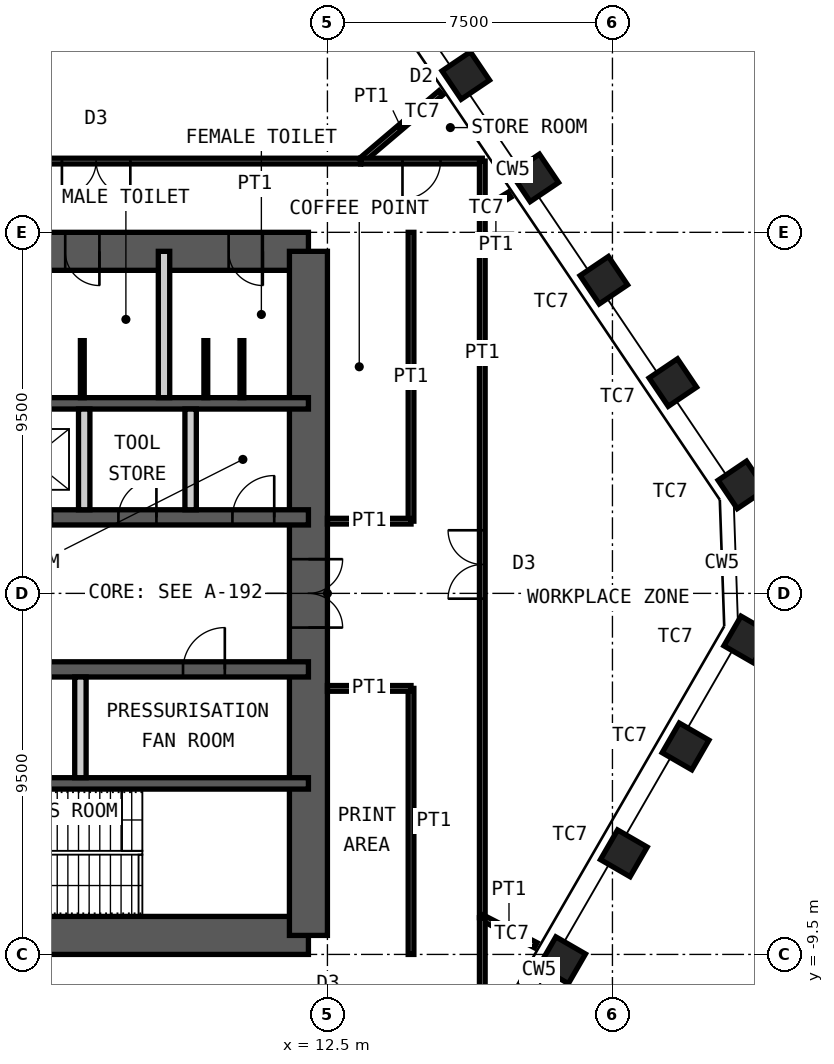
"""IFC4 building model, lengths in metres.
Left out: names, types, materials, properties, quantities, classifications, styles, units other than length and angle.
Written with IfcOpenShell. Run it as: python <this file> out.ifc"""

import sys

from ifc_helpers import new_model, si_unit, direction, frame, frame_2d, origin, origin_2d, place, context, subcontext, project, spatial, rectangle, hollow_rectangle, extrude, element, fill, save


model = new_model("IFC4")
c1 = context("Model", 3, precision=1e-05, world=origin(), true_north=direction((0.0, 1.0)))
c2 = subcontext(c1, "Body", "Model", "MODEL_VIEW")
j1 = project(units=[si_unit("LENGTHUNIT", "METRE"), si_unit("PLANEANGLEUNIT", "RADIAN")], contexts=[c1])
p1 = place(None, origin())
s1 = spatial("IfcSite", under=j1, at=p1, CompositionType="ELEMENT")
p2 = place(p1, origin())
s2 = spatial("IfcBuilding", under=s1, at=p2, CompositionType="ELEMENT")
p3 = place(p2, frame((0.0, 0.0, 291.4)))
s3 = spatial("IfcBuildingStorey", under=s2, at=p3, CompositionType="ELEMENT", Elevation=291.4)
for number, where, z_axis, x_axis in (
    (1, (16.141, 13.625, 0.0), (0.0, 0.0, 1.0), (-0.559, 0.829, 0.0)),
    (2, (17.957, 10.932, 0.0), (0.0, 0.0, 1.0), (-0.559, 0.829, 0.0)),
    (3, (19.773, 8.239, 0.0), (0.0, 0.0, 1.0), (-0.559, 0.829, 0.0)),
    (4, (21.589, 5.547, 0.0), (0.0, 0.0, 1.0), (-0.559, 0.829, 0.0)),
    (5, (23.406, 2.854, 0.0), (0.0, 0.0, 1.0), (-0.559, 0.829, 0.0)),
    (6, (23.548, -1.214, 0.0), (0.0, 0.0, 1.0), (0.5, 0.866, 0.0)),
    (7, (21.924, -4.027, 0.0), (0.0, 0.0, 1.0), (0.5, 0.866, 0.0)),
    (8, (20.3, -6.84, 0.0), (0.0, 0.0, 1.0), (0.5, 0.866, 0.0)),
    (9, (18.676, -9.653, 0.0), (0.0, 0.0, 1.0), (0.5, 0.866, 0.0)),
):
    element("IfcColumn", number, at=place(p3, frame(where, z_axis=z_axis, x_axis=x_axis)), inside=s3, PredefinedType="COLUMN", context=c2, shape_type="SweptSolid", body=[
        extrude(hollow_rectangle(XDim=0.9, YDim=0.9, WallThickness=0.06, at=origin_2d()), origin(), (0.0, 0.0, 1.0), 4.2),
    ])
p4 = place(p3, frame((-12.0, 9.0, 0.0), z_axis=(0.0, 0.0, 1.0), x_axis=(1.0, 0.0, 0.0)))
e10 = element("IfcWall", 10, at=p4, inside=s3, PredefinedType="SHEAR", context=c2, shape_type="SweptSolid", body=[
    extrude(rectangle(XDim=24.0, YDim=1.0, at=frame_2d((12.0, 0.0))), origin(), (0.0, 0.0, 1.0), 4.2),
])
p5 = place(p4, frame((10.4, 0.0, 0.0)))
e11 = element("IfcOpeningElement", 11, at=p5, cuts=e10, PredefinedType="OPENING", context=c2, shape_type="SweptSolid", body=[
    extrude(rectangle(XDim=1.0, YDim=2.1, at=frame_2d((0.5, 1.05))), frame((0.0, 0.51, 0.0), z_axis=(0.0, -1.0, 0.0), x_axis=(1.0, 0.0, 0.0)), (0.0, 0.0, 1.0), 1.02),
])
p6 = place(p4, frame((17.6, 0.0, 0.0)))
e12 = element("IfcOpeningElement", 12, at=p6, cuts=e10, PredefinedType="OPENING", context=c2, shape_type="SweptSolid", body=[
    extrude(rectangle(XDim=0.9, YDim=2.1, at=frame_2d((0.45, 1.05))), frame((0.0, 0.51, 0.0), z_axis=(0.0, -1.0, 0.0), x_axis=(1.0, 0.0, 0.0)), (0.0, 0.0, 1.0), 1.02),
])
p7 = place(p4, frame((21.9, 0.0, 0.0)))
e13 = element("IfcOpeningElement", 13, at=p7, cuts=e10, PredefinedType="OPENING", context=c2, shape_type="SweptSolid", body=[
    extrude(rectangle(XDim=0.9, YDim=2.1, at=frame_2d((0.45, 1.05))), frame((0.0, 0.51, 0.0), z_axis=(0.0, -1.0, 0.0), x_axis=(1.0, 0.0, 0.0)), (0.0, 0.0, 1.0), 1.02),
])
p8 = place(p3, frame((-12.0, -9.0, 0.0), z_axis=(0.0, 0.0, 1.0), x_axis=(1.0, 0.0, 0.0)))
e14 = element("IfcWall", 14, at=p8, inside=s3, PredefinedType="SHEAR", context=c2, shape_type="SweptSolid", body=[
    extrude(rectangle(XDim=24.0, YDim=1.0, at=frame_2d((12.0, 0.0))), origin(), (0.0, 0.0, 1.0), 4.2),
])
p9 = place(p8, frame((1.35, 0.0, 0.0)))
e15 = element("IfcOpeningElement", 15, at=p9, cuts=e14, PredefinedType="OPENING", context=c2, shape_type="SweptSolid", body=[
    extrude(rectangle(XDim=1.0, YDim=2.1, at=frame_2d((0.5, 1.05))), frame((0.0, 0.51, 0.0), z_axis=(0.0, -1.0, 0.0), x_axis=(1.0, 0.0, 0.0)), (0.0, 0.0, 1.0), 1.02),
])
p10 = place(p8, frame((5.325, 0.0, 0.0)))
e16 = element("IfcOpeningElement", 16, at=p10, cuts=e14, PredefinedType="OPENING", context=c2, shape_type="SweptSolid", body=[
    extrude(rectangle(XDim=1.15, YDim=2.1, at=frame_2d((0.575, 1.05))), frame((0.0, 0.51, 0.0), z_axis=(0.0, -1.0, 0.0), x_axis=(1.0, 0.0, 0.0)), (0.0, 0.0, 1.0), 1.02),
])
p11 = place(p8, frame((12.6, 0.0, 0.0)))
e17 = element("IfcOpeningElement", 17, at=p11, cuts=e14, PredefinedType="OPENING", context=c2, shape_type="SweptSolid", body=[
    extrude(rectangle(XDim=1.0, YDim=2.1, at=frame_2d((0.5, 1.05))), frame((0.0, 0.51, 0.0), z_axis=(0.0, -1.0, 0.0), x_axis=(1.0, 0.0, 0.0)), (0.0, 0.0, 1.0), 1.02),
])
p12 = place(p3, frame((12.0, -9.0, 0.0), z_axis=(0.0, 0.0, 1.0), x_axis=(0.0, 1.0, 0.0)))
e18 = element("IfcWall", 18, at=p12, inside=s3, PredefinedType="SHEAR", context=c2, shape_type="SweptSolid", body=[
    extrude(rectangle(XDim=18.0, YDim=1.0, at=frame_2d((9.0, 0.0))), origin(), (0.0, 0.0, 1.0), 4.2),
])
p13 = place(p12, frame((8.1, 0.0, 0.0)))
e19 = element("IfcOpeningElement", 19, at=p13, cuts=e18, PredefinedType="OPENING", context=c2, shape_type="SweptSolid", body=[
    extrude(rectangle(XDim=1.8, YDim=2.1, at=frame_2d((0.9, 1.05))), frame((0.0, 0.51, 0.0), z_axis=(0.0, -1.0, 0.0), x_axis=(1.0, 0.0, 0.0)), (0.0, 0.0, 1.0), 1.02),
])
p14 = place(p3, frame((-12.0, 5.0, 0.0), z_axis=(0.0, 0.0, 1.0), x_axis=(1.0, 0.0, 0.0)))
e20 = element("IfcWall", 20, at=p14, inside=s3, PredefinedType="SHEAR", context=c2, shape_type="SweptSolid", body=[
    extrude(rectangle(XDim=24.0, YDim=0.3, at=frame_2d((12.0, 0.0))), origin(), (0.0, 0.0, 1.0), 4.2),
])
p15 = place(p3, frame((-12.0, 2.0, 0.0), z_axis=(0.0, 0.0, 1.0), x_axis=(1.0, 0.0, 0.0)))
e21 = element("IfcWall", 21, at=p15, inside=s3, PredefinedType="SHEAR", context=c2, shape_type="SweptSolid", body=[
    extrude(rectangle(XDim=24.0, YDim=0.4, at=frame_2d((12.0, 0.0))), origin(), (0.0, 0.0, 1.0), 4.2),
])
p16 = place(p15, frame((2.4, 0.0, 0.0)))
e22 = element("IfcOpeningElement", 22, at=p16, cuts=e21, PredefinedType="OPENING", context=c2, shape_type="SweptSolid", body=[
    extrude(rectangle(XDim=1.1, YDim=2.1, at=frame_2d((0.55, 1.05))), frame((0.0, 0.21, 0.0), z_axis=(0.0, -1.0, 0.0), x_axis=(1.0, 0.0, 0.0)), (0.0, 0.0, 1.0), 0.42),
])
p17 = place(p15, frame((22.0, 0.0, 0.0)))
e23 = element("IfcOpeningElement", 23, at=p17, cuts=e21, PredefinedType="OPENING", context=c2, shape_type="SweptSolid", body=[
    extrude(rectangle(XDim=1.1, YDim=2.1, at=frame_2d((0.55, 1.05))), frame((0.0, 0.21, 0.0), z_axis=(0.0, -1.0, 0.0), x_axis=(1.0, 0.0, 0.0)), (0.0, 0.0, 1.0), 0.42),
])
p18 = place(p15, frame((10.15, 0.0, 0.0)))
e24 = element("IfcOpeningElement", 24, at=p18, cuts=e21, PredefinedType="OPENING", context=c2, shape_type="SweptSolid", body=[
    extrude(rectangle(XDim=1.0, YDim=2.1, at=frame_2d((0.5, 1.05))), frame((0.0, 0.21, 0.0), z_axis=(0.0, -1.0, 0.0), x_axis=(1.0, 0.0, 0.0)), (0.0, 0.0, 1.0), 0.42),
])
p19 = place(p15, frame((6.9, 0.0, 0.0)))
e25 = element("IfcOpeningElement", 25, at=p19, cuts=e21, PredefinedType="OPENING", context=c2, shape_type="SweptSolid", body=[
    extrude(rectangle(XDim=1.0, YDim=2.1, at=frame_2d((0.5, 1.05))), frame((0.0, 0.21, 0.0), z_axis=(0.0, -1.0, 0.0), x_axis=(1.0, 0.0, 0.0)), (0.0, 0.0, 1.0), 0.42),
])
p20 = place(p15, frame((13.35, 0.0, 0.0)))
e26 = element("IfcOpeningElement", 26, at=p20, cuts=e21, PredefinedType="OPENING", context=c2, shape_type="SweptSolid", body=[
    extrude(rectangle(XDim=1.1, YDim=2.4, at=frame_2d((0.55, 1.2))), frame((0.0, 0.21, 0.0), z_axis=(0.0, -1.0, 0.0), x_axis=(1.0, 0.0, 0.0)), (0.0, 0.0, 1.0), 0.42),
])
p21 = place(p15, frame((16.15, 0.0, 0.0)))
e27 = element("IfcOpeningElement", 27, at=p21, cuts=e21, PredefinedType="OPENING", context=c2, shape_type="SweptSolid", body=[
    extrude(rectangle(XDim=1.1, YDim=2.4, at=frame_2d((0.55, 1.2))), frame((0.0, 0.21, 0.0), z_axis=(0.0, -1.0, 0.0), x_axis=(1.0, 0.0, 0.0)), (0.0, 0.0, 1.0), 0.42),
])
p22 = place(p15, frame((19.0, 0.0, 0.0)))
e28 = element("IfcOpeningElement", 28, at=p22, cuts=e21, PredefinedType="OPENING", context=c2, shape_type="SweptSolid", body=[
    extrude(rectangle(XDim=1.0, YDim=2.1, at=frame_2d((0.5, 1.05))), frame((0.0, 0.21, 0.0), z_axis=(0.0, -1.0, 0.0), x_axis=(1.0, 0.0, 0.0)), (0.0, 0.0, 1.0), 0.42),
])
p23 = place(p3, frame((-12.0, -2.0, 0.0), z_axis=(0.0, 0.0, 1.0), x_axis=(1.0, 0.0, 0.0)))
e29 = element("IfcWall", 29, at=p23, inside=s3, PredefinedType="SHEAR", context=c2, shape_type="SweptSolid", body=[
    extrude(rectangle(XDim=24.0, YDim=0.4, at=frame_2d((12.0, 0.0))), origin(), (0.0, 0.0, 1.0), 4.2),
])
p24 = place(p23, frame((1.1, 0.0, 0.0)))
e30 = element("IfcOpeningElement", 30, at=p24, cuts=e29, PredefinedType="OPENING", context=c2, shape_type="SweptSolid", body=[
    extrude(rectangle(XDim=1.1, YDim=2.1, at=frame_2d((0.55, 1.05))), frame((0.0, 0.21, 0.0), z_axis=(0.0, -1.0, 0.0), x_axis=(1.0, 0.0, 0.0)), (0.0, 0.0, 1.0), 0.42),
])
p25 = place(p23, frame((13.55, 0.0, 0.0)))
e31 = element("IfcOpeningElement", 31, at=p25, cuts=e29, PredefinedType="OPENING", context=c2, shape_type="SweptSolid", body=[
    extrude(rectangle(XDim=1.1, YDim=2.1, at=frame_2d((0.55, 1.05))), frame((0.0, 0.21, 0.0), z_axis=(0.0, -1.0, 0.0), x_axis=(1.0, 0.0, 0.0)), (0.0, 0.0, 1.0), 0.42),
])
p26 = place(p23, frame((20.7, 0.0, 0.0)))
e32 = element("IfcOpeningElement", 32, at=p26, cuts=e29, PredefinedType="OPENING", context=c2, shape_type="SweptSolid", body=[
    extrude(rectangle(XDim=1.1, YDim=2.1, at=frame_2d((0.55, 1.05))), frame((0.0, 0.21, 0.0), z_axis=(0.0, -1.0, 0.0), x_axis=(1.0, 0.0, 0.0)), (0.0, 0.0, 1.0), 0.42),
])
p27 = place(p23, frame((4.0, 0.0, 0.0)))
e33 = element("IfcOpeningElement", 33, at=p27, cuts=e29, PredefinedType="OPENING", context=c2, shape_type="SweptSolid", body=[
    extrude(rectangle(XDim=1.0, YDim=2.1, at=frame_2d((0.5, 1.05))), frame((0.0, 0.21, 0.0), z_axis=(0.0, -1.0, 0.0), x_axis=(1.0, 0.0, 0.0)), (0.0, 0.0, 1.0), 0.42),
])
p28 = place(p23, frame((6.8, 0.0, 0.0)))
e34 = element("IfcOpeningElement", 34, at=p28, cuts=e29, PredefinedType="OPENING", context=c2, shape_type="SweptSolid", body=[
    extrude(rectangle(XDim=1.0, YDim=2.1, at=frame_2d((0.5, 1.05))), frame((0.0, 0.21, 0.0), z_axis=(0.0, -1.0, 0.0), x_axis=(1.0, 0.0, 0.0)), (0.0, 0.0, 1.0), 0.42),
])
p29 = place(p23, frame((9.6, 0.0, 0.0)))
e35 = element("IfcOpeningElement", 35, at=p29, cuts=e29, PredefinedType="OPENING", context=c2, shape_type="SweptSolid", body=[
    extrude(rectangle(XDim=1.0, YDim=2.1, at=frame_2d((0.5, 1.05))), frame((0.0, 0.21, 0.0), z_axis=(0.0, -1.0, 0.0), x_axis=(1.0, 0.0, 0.0)), (0.0, 0.0, 1.0), 0.42),
])
p30 = place(p3, frame((-12.0, -5.0, 0.0), z_axis=(0.0, 0.0, 1.0), x_axis=(1.0, 0.0, 0.0)))
e36 = element("IfcWall", 36, at=p30, inside=s3, PredefinedType="SHEAR", context=c2, shape_type="SweptSolid", body=[
    extrude(rectangle(XDim=24.0, YDim=0.3, at=frame_2d((12.0, 0.0))), origin(), (0.0, 0.0, 1.0), 4.2),
])
p31 = place(p3, frame((8.2, 5.15, 0.0), z_axis=(0.0, 0.0, 1.0), x_axis=(0.0, 1.0, 0.0)))
e37 = element("IfcWall", 37, at=p31, inside=s3, PredefinedType="PARTITIONING", context=c2, shape_type="SweptSolid", body=[
    extrude(rectangle(XDim=3.85, YDim=0.3, at=frame_2d((1.925, 0.0))), origin(), (0.0, 0.0, 1.0), 3.98),
])
for number, where, z_axis, x_axis in (
    (38, (6.1, 2.2, 0.0), (0.0, 0.0, 1.0), (0.0, 1.0, 0.0)),
    (39, (8.9, 2.2, 0.0), (0.0, 0.0, 1.0), (0.0, 1.0, 0.0)),
    (40, (6.0, -4.85, 0.0), (0.0, 0.0, 1.0), (0.0, 1.0, 0.0)),
):
    element("IfcWall", number, at=place(p3, frame(where, z_axis=z_axis, x_axis=x_axis)), inside=s3, PredefinedType="PARTITIONING", context=c2, shape_type="SweptSolid", body=[
        extrude(rectangle(XDim=2.65, YDim=0.3, at=frame_2d((1.325, 0.0))), origin(), (0.0, 0.0, 1.0), 3.98),
    ])
for number, where, z_axis, x_axis in (
    (41, (6.05, 5.15, 0.0), (0.0, 0.0, 1.0), (0.0, 1.0, 0.0)),
    (42, (9.3, 5.15, 0.0), (0.0, 0.0, 1.0), (0.0, 1.0, 0.0)),
    (43, (10.25, 5.15, 0.0), (0.0, 0.0, 1.0), (0.0, 1.0, 0.0)),
):
    element("IfcWall", number, at=place(p3, frame(where, z_axis=z_axis, x_axis=x_axis)), inside=s3, PredefinedType="PARTITIONING", context=c2, shape_type="SweptSolid", body=[
        extrude(rectangle(XDim=1.5, YDim=0.1, at=frame_2d((0.75, 0.0))), origin(), (0.0, 0.0, 1.0), 2.1),
    ])
p32 = place(p3, frame((-0.548, 11.375, 0.0), z_axis=(0.0, 0.0, 1.0), x_axis=(1.0, 0.0, 0.0)))
e44 = element("IfcWall", 44, at=p32, inside=s3, PredefinedType="PARTITIONING", context=c2, shape_type="SweptSolid", body=[
    extrude(rectangle(XDim=13.923, YDim=0.15, at=frame_2d((6.961, 0.0))), origin(), (0.0, 0.0, 1.0), 4.03),
])
p33 = place(p32, frame((6.062, 0.0, 0.0)))
e45 = element("IfcOpeningElement", 45, at=p33, cuts=e44, PredefinedType="OPENING", context=c2, shape_type="SweptSolid", body=[
    extrude(rectangle(XDim=1.8, YDim=2.4, at=frame_2d((0.9, 1.2))), frame((0.0, 0.085, 0.0), z_axis=(0.0, -1.0, 0.0), x_axis=(1.0, 0.0, 0.0)), (0.0, 0.0, 1.0), 0.17),
])
p34 = place(p3, frame((15.484, 13.169, 0.0), z_axis=(0.0, 0.0, 1.0), x_axis=(-0.761734753955, -0.647889006403, 0.0)))
e46 = element("IfcWall", 46, at=p34, inside=s3, PredefinedType="PARTITIONING", context=c2, shape_type="SweptSolid", body=[
    extrude(rectangle(XDim=2.769, YDim=0.15, at=frame_2d((1.384, 0.0))), origin(), (0.0, 0.0, 1.0), 3.33),
])
p35 = place(p3, frame((13.375, 11.375, 0.0), z_axis=(0.0, 0.0, 1.0), x_axis=(1.0, 0.0, 0.0)))
e47 = element("IfcWall", 47, at=p35, inside=s3, PredefinedType="PARTITIONING", context=c2, shape_type="SweptSolid", body=[
    extrude(rectangle(XDim=3.2, YDim=0.15, at=frame_2d((1.6, 0.0))), origin(), (0.0, 0.0, 1.0), 4.03),
])
p36 = place(p35, frame((1.1, 0.0, 0.0)))
e48 = element("IfcOpeningElement", 48, at=p36, cuts=e47, PredefinedType="OPENING", context=c2, shape_type="SweptSolid", body=[
    extrude(rectangle(XDim=1.0, YDim=2.4, at=frame_2d((0.5, 1.2))), frame((0.0, 0.085, 0.0), z_axis=(0.0, -1.0, 0.0), x_axis=(1.0, 0.0, 0.0)), (0.0, 0.0, 1.0), 0.17),
])
p37 = place(p3, frame((16.575, 11.375, 0.0), z_axis=(0.0, 0.0, 1.0), x_axis=(0.0, -1.0, 0.0)))
e49 = element("IfcWall", 49, at=p37, inside=s3, PredefinedType="PARTITIONING", context=c2, shape_type="SweptSolid", body=[
    extrude(rectangle(XDim=1.321, YDim=0.15, at=frame_2d((0.66, 0.0))), origin(), (0.0, 0.0, 1.0), 4.03),
])
p38 = place(p3, frame((17.291, 10.489, 0.0), z_axis=(0.0, 0.0, 1.0), x_axis=(-0.855013745288, -0.518605336811, 0.0)))
e50 = element("IfcWall", 50, at=p38, inside=s3, PredefinedType="PARTITIONING", context=c2, shape_type="SweptSolid", body=[
    extrude(rectangle(XDim=0.837, YDim=0.15, at=frame_2d((0.419, 0.0))), origin(), (0.0, 0.0, 1.0), 3.33),
])
p39 = place(p3, frame((16.575, 10.054, 0.0), z_axis=(0.0, 0.0, 1.0), x_axis=(0.0, -1.0, 0.0)))
e51 = element("IfcWall", 51, at=p39, inside=s3, PredefinedType="PARTITIONING", context=c2, shape_type="SweptSolid", body=[
    extrude(rectangle(XDim=18.588, YDim=0.15, at=frame_2d((9.294, 0.0))), origin(), (0.0, 0.0, 1.0), 4.03),
])
p40 = place(p39, frame((8.394, 0.0, 0.0)))
e52 = element("IfcOpeningElement", 52, at=p40, cuts=e51, PredefinedType="OPENING", context=c2, shape_type="SweptSolid", body=[
    extrude(rectangle(XDim=1.8, YDim=2.4, at=frame_2d((0.9, 1.2))), frame((0.0, 0.085, 0.0), z_axis=(0.0, -1.0, 0.0), x_axis=(1.0, 0.0, 0.0)), (0.0, 0.0, 1.0), 0.17),
])
p41 = place(p3, frame((17.98, -9.257, 0.0), z_axis=(0.0, 0.0, 1.0), x_axis=(-0.88908312915, 0.457745769463, 0.0)))
e53 = element("IfcWall", 53, at=p41, inside=s3, PredefinedType="PARTITIONING", context=c2, shape_type="SweptSolid", body=[
    extrude(rectangle(XDim=1.581, YDim=0.15, at=frame_2d((0.791, 0.0))), origin(), (0.0, 0.0, 1.0), 3.33),
])
p42 = place(p3, frame((16.575, -8.533, 0.0), z_axis=(0.0, 0.0, 1.0), x_axis=(0.0, -1.0, 0.0)))
e54 = element("IfcWall", 54, at=p42, inside=s3, PredefinedType="PARTITIONING", context=c2, shape_type="SweptSolid", body=[
    extrude(rectangle(XDim=2.842, YDim=0.15, at=frame_2d((1.421, 0.0))), origin(), (0.0, 0.0, 1.0), 4.03),
])
p43 = place(p3, frame((14.7, 1.9, 0.0), z_axis=(0.0, 0.0, 1.0), x_axis=(0.0, 1.0, 0.0)))
e55 = element("IfcWall", 55, at=p43, inside=s3, PredefinedType="PARTITIONING", context=c2, shape_type="SweptSolid", body=[
    extrude(rectangle(XDim=7.6, YDim=0.15, at=frame_2d((3.8, 0.0))), origin(), (0.0, 0.0, 1.0), 4.03),
])
p44 = place(p3, frame((12.5, 1.9, 0.0), z_axis=(0.0, 0.0, 1.0), x_axis=(1.0, 0.0, 0.0)))
e56 = element("IfcWall", 56, at=p44, inside=s3, PredefinedType="PARTITIONING", context=c2, shape_type="SweptSolid", body=[
    extrude(rectangle(XDim=2.2, YDim=0.15, at=frame_2d((1.1, 0.0))), origin(), (0.0, 0.0, 1.0), 2.93),
])
p45 = place(p3, frame((14.7, -9.5, 0.0), z_axis=(0.0, 0.0, 1.0), x_axis=(0.0, 1.0, 0.0)))
e57 = element("IfcWall", 57, at=p45, inside=s3, PredefinedType="PARTITIONING", context=c2, shape_type="SweptSolid", body=[
    extrude(rectangle(XDim=7.0, YDim=0.15, at=frame_2d((3.5, 0.0))), origin(), (0.0, 0.0, 1.0), 4.03),
])
p46 = place(p3, frame((12.5, -2.5, 0.0), z_axis=(0.0, 0.0, 1.0), x_axis=(1.0, 0.0, 0.0)))
e58 = element("IfcWall", 58, at=p46, inside=s3, PredefinedType="PARTITIONING", context=c2, shape_type="SweptSolid", body=[
    extrude(rectangle(XDim=2.2, YDim=0.15, at=frame_2d((1.1, 0.0))), origin(), (0.0, 0.0, 1.0), 3.33),
])
p47 = place(p6, origin())
e59 = element("IfcDoor", 59, at=p47, inside=s3, OperationType="SINGLE_SWING_RIGHT", PredefinedType="DOOR", context=c2, shape_type="SweptSolid", body=[
    extrude(rectangle(XDim=0.9, YDim=2.1, at=frame_2d((0.45, 1.05))), frame((0.0, 0.025, 0.0), z_axis=(0.0, -1.0, 0.0), x_axis=(1.0, 0.0, 0.0)), (0.0, 0.0, 1.0), 0.05),
])
fill(e12, e59)
p48 = place(p7, origin())
e60 = element("IfcDoor", 60, at=p48, inside=s3, OperationType="SINGLE_SWING_RIGHT", PredefinedType="DOOR", context=c2, shape_type="SweptSolid", body=[
    extrude(rectangle(XDim=0.9, YDim=2.1, at=frame_2d((0.45, 1.05))), frame((0.0, 0.025, 0.0), z_axis=(0.0, -1.0, 0.0), x_axis=(1.0, 0.0, 0.0)), (0.0, 0.0, 1.0), 0.05),
])
fill(e13, e60)
p49 = place(p17, origin())
e61 = element("IfcDoor", 61, at=p49, inside=s3, OperationType="SINGLE_SWING_LEFT", PredefinedType="DOOR", context=c2, shape_type="SweptSolid", body=[
    extrude(rectangle(XDim=1.1, YDim=2.1, at=frame_2d((0.55, 1.05))), frame((0.0, 0.025, 0.0), z_axis=(0.0, -1.0, 0.0), x_axis=(1.0, 0.0, 0.0)), (0.0, 0.0, 1.0), 0.05),
])
fill(e23, e61)
p50 = place(p26, origin())
e62 = element("IfcDoor", 62, at=p50, inside=s3, OperationType="SINGLE_SWING_LEFT", PredefinedType="DOOR", context=c2, shape_type="SweptSolid", body=[
    extrude(rectangle(XDim=1.1, YDim=2.1, at=frame_2d((0.55, 1.05))), frame((0.0, 0.025, 0.0), z_axis=(0.0, -1.0, 0.0), x_axis=(1.0, 0.0, 0.0)), (0.0, 0.0, 1.0), 0.05),
])
fill(e32, e62)
p51 = place(p13, origin())
e63 = element("IfcDoor", 63, at=p51, inside=s3, OperationType="DOUBLE_DOOR_DOUBLE_SWING", PredefinedType="DOOR", context=c2, shape_type="SweptSolid", body=[
    extrude(rectangle(XDim=1.8, YDim=2.1, at=frame_2d((0.9, 1.05))), frame((0.0, 0.025, 0.0), z_axis=(0.0, -1.0, 0.0), x_axis=(1.0, 0.0, 0.0)), (0.0, 0.0, 1.0), 0.05),
])
fill(e19, e63)
p52 = place(p22, origin())
e64 = element("IfcDoor", 64, at=p52, inside=s3, OperationType="SINGLE_SWING_LEFT", PredefinedType="DOOR", context=c2, shape_type="SweptSolid", body=[
    extrude(rectangle(XDim=1.0, YDim=2.1, at=frame_2d((0.5, 1.05))), frame((0.0, 0.025, 0.0), z_axis=(0.0, -1.0, 0.0), x_axis=(1.0, 0.0, 0.0)), (0.0, 0.0, 1.0), 0.05),
])
fill(e28, e64)
p53 = place(p33, origin())
e65 = element("IfcDoor", 65, at=p53, inside=s3, OperationType="DOUBLE_DOOR_DOUBLE_SWING", PredefinedType="DOOR", context=c2, shape_type="SweptSolid", body=[
    extrude(rectangle(XDim=1.8, YDim=2.4, at=frame_2d((0.9, 1.2))), frame((0.0, 0.025, 0.0), z_axis=(0.0, -1.0, 0.0), x_axis=(1.0, 0.0, 0.0)), (0.0, 0.0, 1.0), 0.05),
])
fill(e45, e65)
p54 = place(p36, origin())
e66 = element("IfcDoor", 66, at=p54, inside=s3, OperationType="SINGLE_SWING_LEFT", PredefinedType="DOOR", context=c2, shape_type="SweptSolid", body=[
    extrude(rectangle(XDim=1.0, YDim=2.4, at=frame_2d((0.5, 1.2))), frame((0.0, 0.025, 0.0), z_axis=(0.0, -1.0, 0.0), x_axis=(1.0, 0.0, 0.0)), (0.0, 0.0, 1.0), 0.05),
])
fill(e48, e66)
p55 = place(p40, origin())
e67 = element("IfcDoor", 67, at=p55, inside=s3, OperationType="DOUBLE_DOOR_DOUBLE_SWING", PredefinedType="DOOR", context=c2, shape_type="SweptSolid", body=[
    extrude(rectangle(XDim=1.8, YDim=2.4, at=frame_2d((0.9, 1.2))), frame((0.0, 0.025, 0.0), z_axis=(0.0, -1.0, 0.0), x_axis=(1.0, 0.0, 0.0)), (0.0, 0.0, 1.0), 0.05),
])
fill(e52, e67)
save(model, sys.argv[1])
